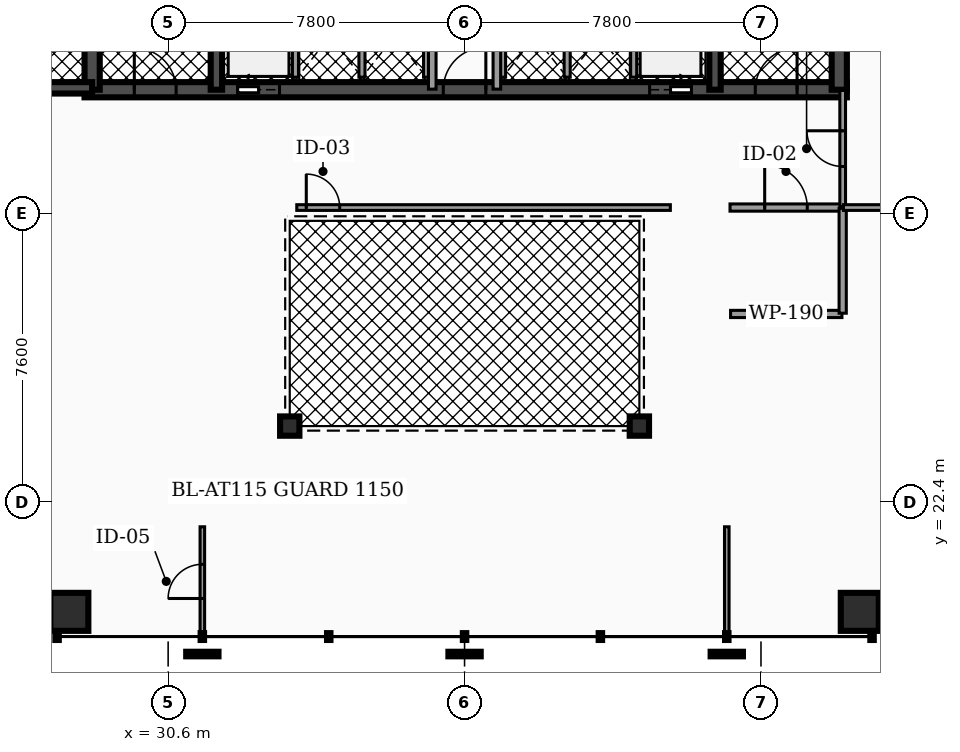
"""IFC4 building model, lengths in metres.
Left out: names, types, materials, properties, quantities, classifications, styles, units other than length and angle.
Written with IfcOpenShell. Run it as: python <this file> out.ifc"""

import sys

from ifc_helpers import new_model, si_unit, direction, frame, frame_2d, origin, origin_2d, place, context, subcontext, project, spatial, rectangle, hollow_rectangle, hollow_circle, extrude, element, fill, save


model = new_model("IFC4")
c1 = context("Model", 3, precision=1e-05, world=origin(), true_north=direction((0.0, 1.0)))
c2 = subcontext(c1, "Body", "Model", "MODEL_VIEW")
j1 = project(units=[si_unit("LENGTHUNIT", "METRE"), si_unit("PLANEANGLEUNIT", "RADIAN")], contexts=[c1])
p1 = place(None, origin())
s1 = spatial("IfcSite", under=j1, at=p1, CompositionType="ELEMENT")
p2 = place(p1, origin())
s2 = spatial("IfcBuilding", under=s1, at=p2, CompositionType="ELEMENT")
p3 = place(p2, frame((0.0, 0.0, 52.02)))
s3 = spatial("IfcBuildingStorey", under=s2, at=p3, CompositionType="ELEMENT", Elevation=52.02)
p4 = place(p3, frame((28.4, 33.25, 0.0), z_axis=(0.0, 0.0, 1.0), x_axis=(1.0, 0.0, 0.0)))
e1 = element("IfcWall", 1, at=p4, inside=s3, PredefinedType="SHEAR", context=c2, shape_type="SweptSolid", body=[
    extrude(rectangle(XDim=20.06, YDim=0.4, at=frame_2d((10.03, 0.0))), origin(), (0.0, 0.0, 1.0), 3.82),
])
p5 = place(p4, frame((4.03, 0.0, 0.0)))
e2 = element("IfcOpeningElement", 2, at=p5, cuts=e1, PredefinedType="OPENING", context=c2, shape_type="SweptSolid", body=[
    extrude(rectangle(XDim=1.1, YDim=2.15, at=frame_2d((0.55, 1.075))), frame((0.0, 0.21, 0.0), z_axis=(0.0, -1.0, 0.0), x_axis=(1.0, 0.0, 0.0)), (0.0, 0.0, 1.0), 0.42),
])
p6 = place(p4, frame((14.87, 0.0, 0.0)))
e3 = element("IfcOpeningElement", 3, at=p6, cuts=e1, PredefinedType="OPENING", context=c2, shape_type="SweptSolid", body=[
    extrude(rectangle(XDim=1.1, YDim=2.15, at=frame_2d((0.55, 1.075))), frame((0.0, 0.21, 0.0), z_axis=(0.0, -1.0, 0.0), x_axis=(1.0, 0.0, 0.0)), (0.0, 0.0, 1.0), 0.42),
])
p7 = place(p4, frame((1.31, 0.0, 0.0)))
e4 = element("IfcOpeningElement", 4, at=p7, cuts=e1, PredefinedType="OPENING", context=c2, shape_type="SweptSolid", body=[
    extrude(rectangle(XDim=1.1, YDim=2.2, at=frame_2d((0.55, 1.1))), frame((0.0, 0.21, 0.0), z_axis=(0.0, -1.0, 0.0), x_axis=(1.0, 0.0, 0.0)), (0.0, 0.0, 1.0), 0.42),
])
p8 = place(p4, frame((9.44, 0.0, 0.0)))
e5 = element("IfcOpeningElement", 5, at=p8, cuts=e1, PredefinedType="OPENING", context=c2, shape_type="SweptSolid", body=[
    extrude(rectangle(XDim=1.12, YDim=2.05, at=frame_2d((0.56, 1.025))), frame((0.0, 0.21, 0.0), z_axis=(0.0, -1.0, 0.0), x_axis=(1.0, 0.0, 0.0)), (0.0, 0.0, 1.0), 0.42),
])
p9 = place(p4, frame((17.65, 0.0, 0.0)))
e6 = element("IfcOpeningElement", 6, at=p9, cuts=e1, PredefinedType="OPENING", context=c2, shape_type="SweptSolid", body=[
    extrude(rectangle(XDim=1.1, YDim=2.2, at=frame_2d((0.55, 1.1))), frame((0.0, 0.21, 0.0), z_axis=(0.0, -1.0, 0.0), x_axis=(1.0, 0.0, 0.0)), (0.0, 0.0, 1.0), 0.42),
])
p10 = place(p3, frame((28.6, 33.25, 0.0), z_axis=(0.0, 0.0, 1.0), x_axis=(0.0, 1.0, 0.0)))
e7 = element("IfcWall", 7, at=p10, inside=s3, PredefinedType="SHEAR", context=c2, shape_type="SweptSolid", body=[
    extrude(rectangle(XDim=10.2, YDim=0.4, at=frame_2d((5.1, 0.0))), origin(), (0.0, 0.0, 1.0), 3.82),
])
for number, where, z_axis, x_axis in (
    (8, (31.87, 33.25, 0.0), (0.0, 0.0, 1.0), (0.0, 1.0, 0.0)),
    (9, (44.99, 33.25, 0.0), (0.0, 0.0, 1.0), (0.0, 1.0, 0.0)),
):
    element("IfcWall", number, at=place(p3, frame(where, z_axis=z_axis, x_axis=x_axis)), inside=s3, PredefinedType="SHEAR", context=c2, shape_type="SweptSolid", body=[
        extrude(rectangle(XDim=10.2, YDim=0.3, at=frame_2d((5.1, 0.0))), origin(), (0.0, 0.0, 1.0), 3.82),
    ])
p11 = place(p3, frame((48.26, 33.25, 0.0), z_axis=(0.0, 0.0, 1.0), x_axis=(0.0, 1.0, 0.0)))
e10 = element("IfcWall", 10, at=p11, inside=s3, PredefinedType="SHEAR", context=c2, shape_type="SweptSolid", body=[
    extrude(rectangle(XDim=10.2, YDim=0.4, at=frame_2d((5.1, 0.0))), origin(), (0.0, 0.0, 1.0), 3.82),
])
p12 = place(p3, frame((25.08, 33.3, 0.0), z_axis=(0.0, 0.0, 1.0), x_axis=(1.0, 0.0, 0.0)))
e11 = element("IfcWall", 11, at=p12, inside=s3, PredefinedType="SHEAR", context=c2, shape_type="SweptSolid", body=[
    extrude(rectangle(XDim=3.52, YDim=0.3, at=frame_2d((1.76, 0.0))), origin(), (0.0, 0.0, 1.0), 3.82),
])
p13 = place(p12, frame((1.335, 0.0, 0.0)))
e12 = element("IfcOpeningElement", 12, at=p13, cuts=e11, PredefinedType="OPENING", context=c2, shape_type="SweptSolid", body=[
    extrude(rectangle(XDim=0.95, YDim=2.2, at=frame_2d((0.475, 1.1))), frame((0.0, 0.16, 0.0), z_axis=(0.0, -1.0, 0.0), x_axis=(1.0, 0.0, 0.0)), (0.0, 0.0, 1.0), 0.32),
])
for number, where, z_axis, x_axis in (
    (13, (28.0, 19.512, 0.0), (0.0, 0.0, 1.0), (1.0, 0.0, 0.0)),
    (14, (48.8, 19.512, 0.0), (0.0, 0.0, 1.0), (1.0, 0.0, 0.0)),
):
    element("IfcColumn", number, at=place(p3, frame(where, z_axis=z_axis, x_axis=x_axis)), inside=s3, PredefinedType="COLUMN", context=c2, shape_type="SweptSolid", body=[
        extrude(hollow_rectangle(XDim=1.0, YDim=1.0, WallThickness=0.05, at=origin_2d()), origin(), (0.0, 0.0, 1.0), 3.82),
    ])
for number, where, z_axis, x_axis in (
    (15, (33.8, 24.4, 0.0), (0.0, 0.0, 1.0), (1.0, 0.0, 0.0)),
    (16, (43.0, 24.4, 0.0), (0.0, 0.0, 1.0), (1.0, 0.0, 0.0)),
):
    element("IfcColumn", number, at=place(p3, frame(where, z_axis=z_axis, x_axis=x_axis)), inside=s3, PredefinedType="COLUMN", context=c2, shape_type="SweptSolid", body=[
        extrude(hollow_circle(Radius=0.254, WallThickness=0.02, at=origin_2d()), origin(), (0.0, 0.0, 1.0), 3.82),
    ])
for number, where, z_axis, x_axis in (
    (17, (33.95, 33.58, 0.0), (0.0, 0.0, 1.0), (0.0, 1.0, 0.0)),
    (18, (42.85, 33.58, 0.0), (0.0, 0.0, 1.0), (0.0, 1.0, 0.0)),
):
    element("IfcWall", number, at=place(p3, frame(where, z_axis=z_axis, x_axis=x_axis)), inside=s3, PredefinedType="SOLIDWALL", context=c2, shape_type="SweptSolid", body=[
        extrude(rectangle(XDim=2.45, YDim=0.16, at=frame_2d((1.225, 0.0))), origin(), (0.0, 0.0, 1.0), 2.792),
    ])
for number, where, z_axis, x_axis in (
    (19, (35.7, 33.58, 0.0), (0.0, 0.0, 1.0), (0.0, 1.0, 0.0)),
    (20, (37.4, 33.58, 0.0), (0.0, 0.0, 1.0), (0.0, 1.0, 0.0)),
    (21, (39.4, 33.58, 0.0), (0.0, 0.0, 1.0), (0.0, 1.0, 0.0)),
    (22, (41.1, 33.58, 0.0), (0.0, 0.0, 1.0), (0.0, 1.0, 0.0)),
):
    element("IfcWall", number, at=place(p3, frame(where, z_axis=z_axis, x_axis=x_axis)), inside=s3, PredefinedType="SOLIDWALL", context=c2, shape_type="SweptSolid", body=[
        extrude(rectangle(XDim=2.25, YDim=0.16, at=frame_2d((1.125, 0.0))), origin(), (0.0, 0.0, 1.0), 2.792),
    ])
p14 = place(p3, frame((37.55, 33.265, 0.0), z_axis=(0.0, 0.0, 1.0), x_axis=(0.0, 1.0, 0.0)))
e23 = element("IfcWall", 23, at=p14, inside=s3, PredefinedType="PARTITIONING", context=c2, shape_type="SweptSolid", body=[
    extrude(rectangle(XDim=4.265, YDim=0.2, at=frame_2d((2.133, 0.0))), origin(), (0.0, 0.0, 1.0), 2.777),
])
p15 = place(p14, frame((3.093, 0.0, 0.0)))
e24 = element("IfcOpeningElement", 24, at=p15, cuts=e23, PredefinedType="OPENING", context=c2, shape_type="SweptSolid", body=[
    extrude(rectangle(XDim=0.88, YDim=2.05, at=frame_2d((0.44, 1.025))), frame((0.0, 0.11, 0.0), z_axis=(0.0, -1.0, 0.0), x_axis=(1.0, 0.0, 0.0)), (0.0, 0.0, 1.0), 0.22),
])
p16 = place(p3, frame((39.25, 33.265, 0.0), z_axis=(0.0, 0.0, 1.0), x_axis=(0.0, 1.0, 0.0)))
e25 = element("IfcWall", 25, at=p16, inside=s3, PredefinedType="PARTITIONING", context=c2, shape_type="SweptSolid", body=[
    extrude(rectangle(XDim=4.265, YDim=0.2, at=frame_2d((2.133, 0.0))), origin(), (0.0, 0.0, 1.0), 2.777),
])
p17 = place(p16, frame((3.093, 0.0, 0.0)))
e26 = element("IfcOpeningElement", 26, at=p17, cuts=e25, PredefinedType="OPENING", context=c2, shape_type="SweptSolid", body=[
    extrude(rectangle(XDim=0.88, YDim=2.05, at=frame_2d((0.44, 1.025))), frame((0.0, 0.11, 0.0), z_axis=(0.0, -1.0, 0.0), x_axis=(1.0, 0.0, 0.0)), (0.0, 0.0, 1.0), 0.22),
])
p18 = place(p3, frame((45.385, 30.15, 0.0), z_axis=(0.0, 0.0, 1.0), x_axis=(1.0, 0.0, 0.0)))
e27 = element("IfcWall", 27, at=p18, inside=s3, PredefinedType="PARTITIONING", context=c2, shape_type="SweptSolid", body=[
    extrude(rectangle(XDim=2.945, YDim=0.19, at=frame_2d((1.473, 0.0))), origin(), (0.0, 0.0, 1.0), 2.777),
])
p19 = place(p18, frame((0.913, 0.0, 0.0)))
e28 = element("IfcOpeningElement", 28, at=p19, cuts=e27, PredefinedType="OPENING", context=c2, shape_type="SweptSolid", body=[
    extrude(rectangle(XDim=1.12, YDim=2.05, at=frame_2d((0.56, 1.025))), frame((0.0, 0.105, 0.0), z_axis=(0.0, -1.0, 0.0), x_axis=(1.0, 0.0, 0.0)), (0.0, 0.0, 1.0), 0.21),
])
p20 = place(p3, frame((48.35, 30.17, 0.0), z_axis=(0.0, 0.0, 1.0), x_axis=(0.0, 1.0, 0.0)))
e29 = element("IfcWall", 29, at=p20, inside=s3, PredefinedType="PARTITIONING", context=c2, shape_type="SweptSolid", body=[
    extrude(rectangle(XDim=3.06, YDim=0.15, at=frame_2d((1.53, 0.0))), origin(), (0.0, 0.0, 1.0), 2.777),
])
p21 = place(p20, frame((1.06, 0.0, 0.0)))
e30 = element("IfcOpeningElement", 30, at=p21, cuts=e29, PredefinedType="OPENING", context=c2, shape_type="SweptSolid", body=[
    extrude(rectangle(XDim=0.94, YDim=2.05, at=frame_2d((0.47, 1.025))), frame((0.0, 0.085, 0.0), z_axis=(0.0, -1.0, 0.0), x_axis=(1.0, 0.0, 0.0)), (0.0, 0.0, 1.0), 0.17),
])
p22 = place(p3, frame((33.985, 30.15, 0.0), z_axis=(0.0, 0.0, 1.0), x_axis=(1.0, 0.0, 0.0)))
e31 = element("IfcWall", 31, at=p22, inside=s3, PredefinedType="PARTITIONING", context=c2, shape_type="SweptSolid", body=[
    extrude(rectangle(XDim=9.83, YDim=0.15, at=frame_2d((4.915, 0.0))), origin(), (0.0, 0.0, 1.0), 2.777),
])
p23 = place(p22, frame((0.25, 0.0, 0.0)))
e32 = element("IfcOpeningElement", 32, at=p23, cuts=e31, PredefinedType="OPENING", context=c2, shape_type="SweptSolid", body=[
    extrude(rectangle(XDim=0.88, YDim=2.05, at=frame_2d((0.44, 1.025))), frame((0.0, 0.085, 0.0), z_axis=(0.0, -1.0, 0.0), x_axis=(1.0, 0.0, 0.0)), (0.0, 0.0, 1.0), 0.17),
])
p24 = place(p3, frame((45.4, 27.35, 0.0), z_axis=(0.0, 0.0, 1.0), x_axis=(1.0, 0.0, 0.0)))
e33 = element("IfcWall", 33, at=p24, inside=s3, PredefinedType="PARTITIONING", context=c2, shape_type="SweptSolid", body=[
    extrude(rectangle(XDim=2.93, YDim=0.19, at=frame_2d((1.465, 0.0))), origin(), (0.0, 0.0, 1.0), 2.777),
])
p25 = place(p3, frame((48.35, 27.37, 0.0), z_axis=(0.0, 0.0, 1.0), x_axis=(0.0, 1.0, 0.0)))
e34 = element("IfcWall", 34, at=p25, inside=s3, PredefinedType="PARTITIONING", context=c2, shape_type="SweptSolid", body=[
    extrude(rectangle(XDim=2.76, YDim=0.19, at=frame_2d((1.38, 0.0))), origin(), (0.0, 0.0, 1.0), 2.777),
])
p26 = place(p3, frame((48.37, 30.15, 0.0), z_axis=(0.0, 0.0, 1.0), x_axis=(1.0, 0.0, 0.0)))
e35 = element("IfcWall", 35, at=p26, inside=s3, PredefinedType="PARTITIONING", context=c2, shape_type="SweptSolid", body=[
    extrude(rectangle(XDim=2.06, YDim=0.15, at=frame_2d((1.03, 0.0))), origin(), (0.0, 0.0, 1.0), 2.777),
])
p27 = place(p3, frame((31.5, 18.877, 0.0), z_axis=(0.0, 0.0, 1.0), x_axis=(0.0, 1.0, 0.0)))
e36 = element("IfcWall", 36, at=p27, inside=s3, PredefinedType="PARTITIONING", context=c2, shape_type="SweptSolid", body=[
    extrude(rectangle(XDim=2.873, YDim=0.12, at=frame_2d((1.437, 0.0))), origin(), (0.0, 0.0, 1.0), 2.777),
])
p28 = place(p27, frame((0.987, 0.0, 0.0)))
e37 = element("IfcOpeningElement", 37, at=p28, cuts=e36, PredefinedType="OPENING", context=c2, shape_type="SweptSolid", body=[
    extrude(rectangle(XDim=0.9, YDim=2.05, at=frame_2d((0.45, 1.025))), frame((0.0, 0.07, 0.0), z_axis=(0.0, -1.0, 0.0), x_axis=(1.0, 0.0, 0.0)), (0.0, 0.0, 1.0), 0.14),
])
p29 = place(p3, frame((45.3, 18.877, 0.0), z_axis=(0.0, 0.0, 1.0), x_axis=(0.0, 1.0, 0.0)))
e38 = element("IfcWall", 38, at=p29, inside=s3, PredefinedType="PARTITIONING", context=c2, shape_type="SweptSolid", body=[
    extrude(rectangle(XDim=2.873, YDim=0.12, at=frame_2d((1.437, 0.0))), origin(), (0.0, 0.0, 1.0), 2.777),
])
p30 = place(p5, origin())
e39 = element("IfcDoor", 39, at=p30, inside=s3, OperationType="SLIDING_TO_LEFT", PredefinedType="DOOR", context=c2, shape_type="SweptSolid", body=[
    extrude(rectangle(XDim=1.1, YDim=2.15, at=frame_2d((0.55, 1.075))), frame((0.0, 0.025, 0.0), z_axis=(0.0, -1.0, 0.0), x_axis=(1.0, 0.0, 0.0)), (0.0, 0.0, 1.0), 0.05),
])
fill(e2, e39)
p31 = place(p6, origin())
e40 = element("IfcDoor", 40, at=p31, inside=s3, OperationType="SLIDING_TO_RIGHT", PredefinedType="DOOR", context=c2, shape_type="SweptSolid", body=[
    extrude(rectangle(XDim=1.1, YDim=2.15, at=frame_2d((0.55, 1.075))), frame((0.0, 0.025, 0.0), z_axis=(0.0, -1.0, 0.0), x_axis=(1.0, 0.0, 0.0)), (0.0, 0.0, 1.0), 0.05),
])
fill(e3, e40)
p32 = place(p7, origin())
e41 = element("IfcDoor", 41, at=p32, inside=s3, OperationType="SINGLE_SWING_LEFT", PredefinedType="DOOR", context=c2, shape_type="SweptSolid", body=[
    extrude(rectangle(XDim=1.1, YDim=2.2, at=frame_2d((0.55, 1.1))), frame((0.0, 0.025, 0.0), z_axis=(0.0, -1.0, 0.0), x_axis=(1.0, 0.0, 0.0)), (0.0, 0.0, 1.0), 0.05),
])
fill(e4, e41)
p33 = place(p8, origin())
e42 = element("IfcDoor", 42, at=p33, inside=s3, OperationType="SINGLE_SWING_RIGHT", PredefinedType="DOOR", context=c2, shape_type="SweptSolid", body=[
    extrude(rectangle(XDim=1.12, YDim=2.05, at=frame_2d((0.56, 1.025))), frame((0.0, 0.025, 0.0), z_axis=(0.0, -1.0, 0.0), x_axis=(1.0, 0.0, 0.0)), (0.0, 0.0, 1.0), 0.05),
])
fill(e5, e42)
p34 = place(p9, origin())
e43 = element("IfcDoor", 43, at=p34, inside=s3, OperationType="SINGLE_SWING_RIGHT", PredefinedType="DOOR", context=c2, shape_type="SweptSolid", body=[
    extrude(rectangle(XDim=1.1, YDim=2.2, at=frame_2d((0.55, 1.1))), frame((0.0, 0.025, 0.0), z_axis=(0.0, -1.0, 0.0), x_axis=(1.0, 0.0, 0.0)), (0.0, 0.0, 1.0), 0.05),
])
fill(e6, e43)
p35 = place(p19, origin())
e44 = element("IfcDoor", 44, at=p35, inside=s3, OperationType="SINGLE_SWING_LEFT", PredefinedType="DOOR", context=c2, shape_type="SweptSolid", body=[
    extrude(rectangle(XDim=1.12, YDim=2.05, at=frame_2d((0.56, 1.025))), frame((0.0, 0.025, 0.0), z_axis=(0.0, -1.0, 0.0), x_axis=(1.0, 0.0, 0.0)), (0.0, 0.0, 1.0), 0.05),
])
fill(e28, e44)
p36 = place(p21, origin())
e45 = element("IfcDoor", 45, at=p36, inside=s3, OperationType="SINGLE_SWING_RIGHT", PredefinedType="DOOR", context=c2, shape_type="SweptSolid", body=[
    extrude(rectangle(XDim=0.94, YDim=2.05, at=frame_2d((0.47, 1.025))), frame((0.0, 0.025, 0.0), z_axis=(0.0, -1.0, 0.0), x_axis=(1.0, 0.0, 0.0)), (0.0, 0.0, 1.0), 0.05),
])
fill(e30, e45)
p37 = place(p23, origin())
e46 = element("IfcDoor", 46, at=p37, inside=s3, OperationType="SINGLE_SWING_LEFT", PredefinedType="DOOR", context=c2, shape_type="SweptSolid", body=[
    extrude(rectangle(XDim=0.88, YDim=2.05, at=frame_2d((0.44, 1.025))), frame((0.0, 0.025, 0.0), z_axis=(0.0, -1.0, 0.0), x_axis=(1.0, 0.0, 0.0)), (0.0, 0.0, 1.0), 0.05),
])
fill(e32, e46)
p38 = place(p28, origin())
e47 = element("IfcDoor", 47, at=p38, inside=s3, OperationType="SINGLE_SWING_LEFT", PredefinedType="DOOR", context=c2, shape_type="SweptSolid", body=[
    extrude(rectangle(XDim=0.9, YDim=2.05, at=frame_2d((0.45, 1.025))), frame((0.0, 0.025, 0.0), z_axis=(0.0, -1.0, 0.0), x_axis=(1.0, 0.0, 0.0)), (0.0, 0.0, 1.0), 0.05),
])
fill(e37, e47)
save(model, sys.argv[1])
